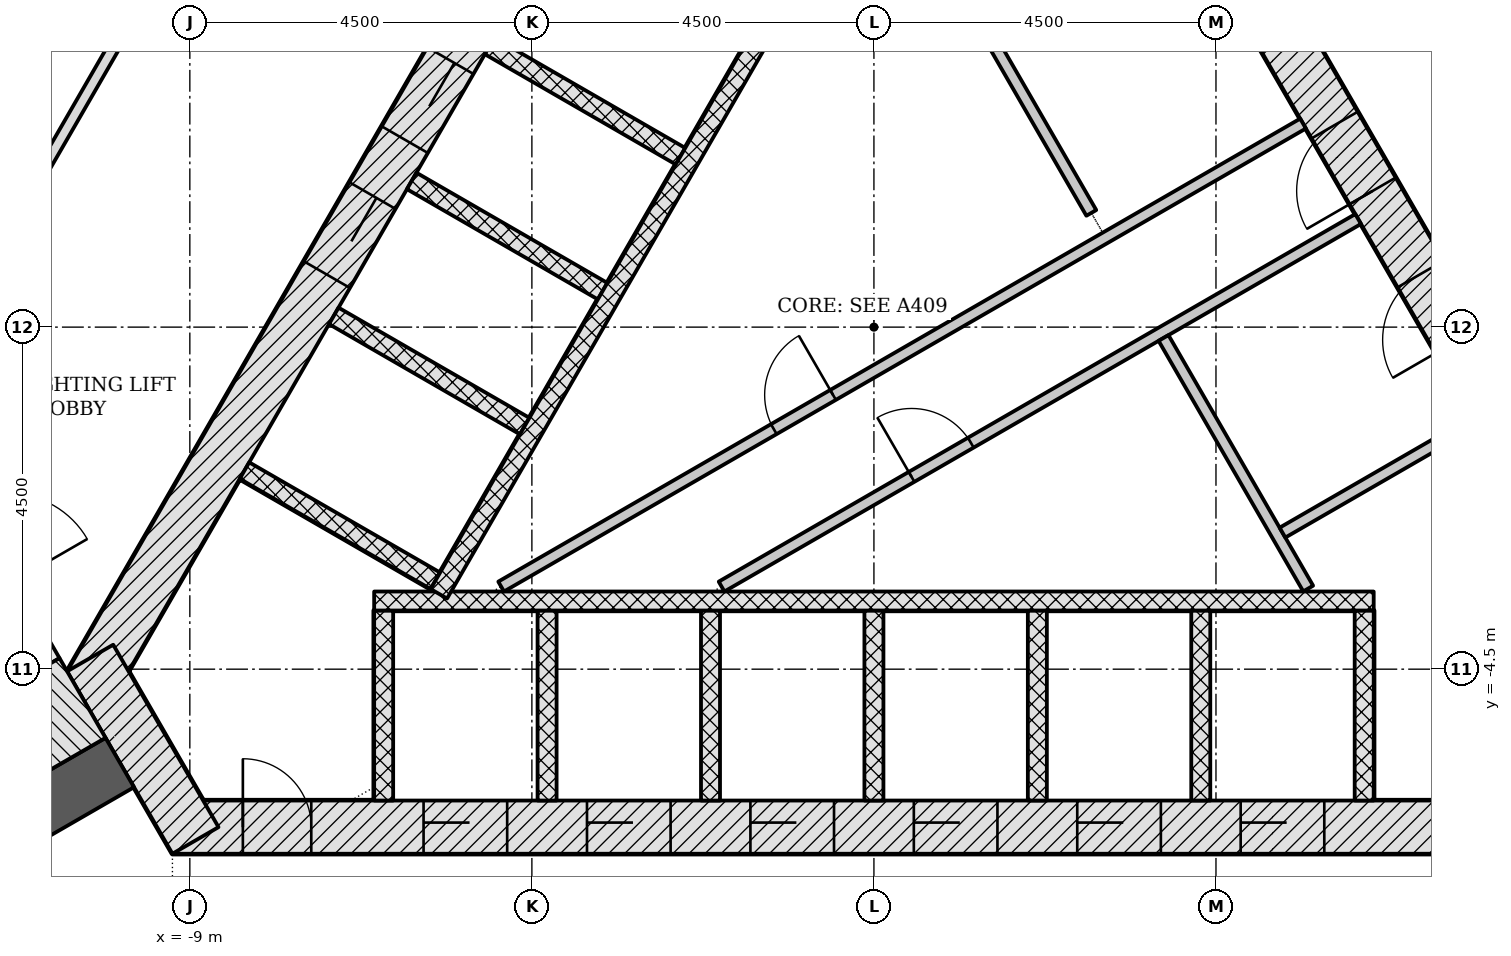
"""IFC4 building model, lengths in metres.
Left out: names, types, materials, properties, quantities, classifications, styles, units other than length and angle.
Written with IfcOpenShell. Run it as: python <this file> out.ifc"""

import sys

from ifc_helpers import new_model, si_unit, direction, frame, frame_2d, origin, place, context, subcontext, project, spatial, rectangle, extrude, element, fill, save


model = new_model("IFC4")
c1 = context("Model", 3, precision=1e-05, world=origin(), true_north=direction((0.0, 1.0)))
c2 = subcontext(c1, "Body", "Model", "MODEL_VIEW")
j1 = project(units=[si_unit("LENGTHUNIT", "METRE"), si_unit("PLANEANGLEUNIT", "RADIAN")], contexts=[c1])
p1 = place(None, origin())
s1 = spatial("IfcSite", under=j1, at=p1, CompositionType="ELEMENT")
p2 = place(p1, origin())
s2 = spatial("IfcBuilding", under=s1, at=p2, CompositionType="ELEMENT")
p3 = place(p2, frame((0.0, 0.0, 116.7)))
s3 = spatial("IfcBuildingStorey", under=s2, at=p3, CompositionType="ELEMENT", Elevation=116.7)
p4 = place(p3, frame((-9.229, -6.578, -0.2), z_axis=(0.0, 0.0, 1.0), x_axis=(1.0, 0.0, 0.0)))
e1 = element("IfcWall", 1, at=p4, inside=s3, PredefinedType="SHEAR", context=c2, shape_type="SweptSolid", body=[
    extrude(rectangle(XDim=18.458, YDim=0.7, at=frame_2d((9.229, 0.0))), origin(), (0.0, 0.0, 1.0), 3.6),
])
p5 = place(p4, frame((3.304, 0.0, 0.2)))
e2 = element("IfcOpeningElement", 2, at=p5, cuts=e1, PredefinedType="OPENING", context=c2, shape_type="SweptSolid", body=[
    extrude(rectangle(XDim=1.1, YDim=2.1, at=frame_2d((0.55, 1.05))), frame((0.0, 0.36, 0.0), z_axis=(0.0, -1.0, 0.0), x_axis=(1.0, 0.0, 0.0)), (0.0, 0.0, 1.0), 0.72),
])
p6 = place(p4, frame((5.454, 0.0, 0.2)))
e3 = element("IfcOpeningElement", 3, at=p6, cuts=e1, PredefinedType="OPENING", context=c2, shape_type="SweptSolid", body=[
    extrude(rectangle(XDim=1.1, YDim=2.1, at=frame_2d((0.55, 1.05))), frame((0.0, 0.36, 0.0), z_axis=(0.0, -1.0, 0.0), x_axis=(1.0, 0.0, 0.0)), (0.0, 0.0, 1.0), 0.72),
])
p7 = place(p4, frame((7.604, 0.0, 0.2)))
e4 = element("IfcOpeningElement", 4, at=p7, cuts=e1, PredefinedType="OPENING", context=c2, shape_type="SweptSolid", body=[
    extrude(rectangle(XDim=1.1, YDim=2.1, at=frame_2d((0.55, 1.05))), frame((0.0, 0.36, 0.0), z_axis=(0.0, -1.0, 0.0), x_axis=(1.0, 0.0, 0.0)), (0.0, 0.0, 1.0), 0.72),
])
p8 = place(p4, frame((9.754, 0.0, 0.2)))
e5 = element("IfcOpeningElement", 5, at=p8, cuts=e1, PredefinedType="OPENING", context=c2, shape_type="SweptSolid", body=[
    extrude(rectangle(XDim=1.1, YDim=2.1, at=frame_2d((0.55, 1.05))), frame((0.0, 0.36, 0.0), z_axis=(0.0, -1.0, 0.0), x_axis=(1.0, 0.0, 0.0)), (0.0, 0.0, 1.0), 0.72),
])
p9 = place(p4, frame((11.904, 0.0, 0.2)))
e6 = element("IfcOpeningElement", 6, at=p9, cuts=e1, PredefinedType="OPENING", context=c2, shape_type="SweptSolid", body=[
    extrude(rectangle(XDim=1.1, YDim=2.1, at=frame_2d((0.55, 1.05))), frame((0.0, 0.36, 0.0), z_axis=(0.0, -1.0, 0.0), x_axis=(1.0, 0.0, 0.0)), (0.0, 0.0, 1.0), 0.72),
])
p10 = place(p4, frame((14.054, 0.0, 0.2)))
e7 = element("IfcOpeningElement", 7, at=p10, cuts=e1, PredefinedType="OPENING", context=c2, shape_type="SweptSolid", body=[
    extrude(rectangle(XDim=1.1, YDim=2.1, at=frame_2d((0.55, 1.05))), frame((0.0, 0.36, 0.0), z_axis=(0.0, -1.0, 0.0), x_axis=(1.0, 0.0, 0.0)), (0.0, 0.0, 1.0), 0.72),
])
p11 = place(p4, frame((0.926, 0.0, 0.2)))
e8 = element("IfcOpeningElement", 8, at=p11, cuts=e1, PredefinedType="OPENING", context=c2, shape_type="SweptSolid", body=[
    extrude(rectangle(XDim=0.9, YDim=2.1, at=frame_2d((0.45, 1.05))), frame((0.0, 0.36, 0.0), z_axis=(0.0, -1.0, 0.0), x_axis=(1.0, 0.0, 0.0)), (0.0, 0.0, 1.0), 0.72),
])
p12 = place(p3, frame((10.311, -4.703, -0.2), z_axis=(0.0, 0.0, 1.0), x_axis=(-0.500001446645, 0.866024568562, 0.0)))
e9 = element("IfcWall", 9, at=p12, inside=s3, PredefinedType="SHEAR", context=c2, shape_type="SweptSolid", body=[
    extrude(rectangle(XDim=18.458, YDim=0.7, at=frame_2d((9.229, 0.0))), origin(), (0.0, 0.0, 1.0), 3.6),
])
p13 = place(p12, frame((7.5, 0.0, 0.2)))
e10 = element("IfcOpeningElement", 10, at=p13, cuts=e9, PredefinedType="OPENING", context=c2, shape_type="SweptSolid", body=[
    extrude(rectangle(XDim=1.0, YDim=2.1, at=frame_2d((0.5, 1.05))), frame((0.0, 0.36, 0.0), z_axis=(0.0, -1.0, 0.0), x_axis=(1.0, 0.0, 0.0)), (0.0, 0.0, 1.0), 0.72),
])
p14 = place(p12, frame((1.852, 0.0, 0.2)))
e11 = element("IfcOpeningElement", 11, at=p14, cuts=e9, PredefinedType="OPENING", context=c2, shape_type="SweptSolid", body=[
    extrude(rectangle(XDim=0.9, YDim=2.1, at=frame_2d((0.45, 1.05))), frame((0.0, 0.36, 0.0), z_axis=(0.0, -1.0, 0.0), x_axis=(1.0, 0.0, 0.0)), (0.0, 0.0, 1.0), 0.72),
])
p15 = place(p12, frame((5.238, 0.0, 0.2)))
e12 = element("IfcOpeningElement", 12, at=p15, cuts=e9, PredefinedType="OPENING", context=c2, shape_type="SweptSolid", body=[
    extrude(rectangle(XDim=1.0, YDim=2.1, at=frame_2d((0.5, 1.05))), frame((0.0, 0.36, 0.0), z_axis=(0.0, -1.0, 0.0), x_axis=(1.0, 0.0, 0.0)), (0.0, 0.0, 1.0), 0.72),
])
p16 = place(p12, frame((13.63, 0.0, 0.2)))
e13 = element("IfcOpeningElement", 13, at=p16, cuts=e9, PredefinedType="OPENING", context=c2, shape_type="SweptSolid", body=[
    extrude(rectangle(XDim=0.9, YDim=2.1, at=frame_2d((0.45, 1.05))), frame((0.0, 0.36, 0.0), z_axis=(0.0, -1.0, 0.0), x_axis=(1.0, 0.0, 0.0)), (0.0, 0.0, 1.0), 0.72),
])
p17 = place(p3, frame((-1.083, 11.281, -0.2), z_axis=(0.0, 0.0, 1.0), x_axis=(-0.500001446645, -0.866024568562, 0.0)))
e14 = element("IfcWall", 14, at=p17, inside=s3, PredefinedType="SHEAR", context=c2, shape_type="SweptSolid", body=[
    extrude(rectangle(XDim=18.458, YDim=0.7, at=frame_2d((9.229, 0.0))), origin(), (0.0, 0.0, 1.0), 3.6),
])
p18 = place(p17, frame((8.979, 0.0, 0.2)))
e15 = element("IfcOpeningElement", 15, at=p18, cuts=e14, PredefinedType="OPENING", context=c2, shape_type="SweptSolid", body=[
    extrude(rectangle(XDim=1.2, YDim=2.1, at=frame_2d((0.6, 1.05))), frame((0.0, 0.36, 0.0), z_axis=(0.0, -1.0, 0.0), x_axis=(1.0, 0.0, 0.0)), (0.0, 0.0, 1.0), 0.72),
])
p19 = place(p17, frame((11.029, 0.0, 0.2)))
e16 = element("IfcOpeningElement", 16, at=p19, cuts=e14, PredefinedType="OPENING", context=c2, shape_type="SweptSolid", body=[
    extrude(rectangle(XDim=1.2, YDim=2.1, at=frame_2d((0.6, 1.05))), frame((0.0, 0.36, 0.0), z_axis=(0.0, -1.0, 0.0), x_axis=(1.0, 0.0, 0.0)), (0.0, 0.0, 1.0), 0.72),
])
p20 = place(p3, frame((-10.311, -4.353, -0.2), z_axis=(0.0, 0.0, 1.0), x_axis=(0.500042739161, -0.866000726912, 0.0)))
e17 = element("IfcWall", 17, at=p20, inside=s3, PredefinedType="SHEAR", context=c2, shape_type="SweptSolid", body=[
    extrude(rectangle(XDim=2.771, YDim=0.7, at=frame_2d((1.386, 0.0))), origin(), (0.0, 0.0, 1.0), 3.6),
])
p21 = place(p3, frame((-9.922, -5.728, -0.2), z_axis=(0.0, 0.0, 1.0), x_axis=(-0.866024913782, -0.500000848707, 0.0)))
e18 = element("IfcWall", 18, at=p21, inside=s3, PredefinedType="SHEAR", context=c2, shape_type="SweptSolid", body=[
    extrude(rectangle(XDim=11.539, YDim=0.75, at=frame_2d((5.769, 0.0))), origin(), (0.0, 0.0, 1.0), 3.6),
])
for number, where, z_axis, x_axis in (
    (19, (-6.45, -6.228, -0.2), (0.0, 0.0, 1.0), (0.0, 1.0, 0.0)),
    (20, (-4.3, -6.228, -0.2), (0.0, 0.0, 1.0), (0.0, 1.0, 0.0)),
    (21, (-2.15, -6.228, -0.2), (0.0, 0.0, 1.0), (0.0, 1.0, 0.0)),
    (22, (0.0, -6.228, -0.2), (0.0, 0.0, 1.0), (0.0, 1.0, 0.0)),
    (23, (2.15, -6.228, -0.2), (0.0, 0.0, 1.0), (0.0, 1.0, 0.0)),
    (24, (4.3, -6.228, -0.2), (0.0, 0.0, 1.0), (0.0, 1.0, 0.0)),
    (25, (6.45, -6.228, -0.2), (0.0, 0.0, 1.0), (0.0, 1.0, 0.0)),
):
    element("IfcWall", number, at=place(p3, frame(where, z_axis=z_axis, x_axis=x_axis)), inside=s3, PredefinedType="PARTITIONING", context=c2, shape_type="SweptSolid", body=[
        extrude(rectangle(XDim=2.5, YDim=0.25, at=frame_2d((1.25, 0.0))), origin(), (0.0, 0.0, 1.0), 3.6),
    ])
p22 = place(p3, frame((-6.575, -3.603, 0.0), z_axis=(0.0, 0.0, 1.0), x_axis=(1.0, 0.0, 0.0)))
e26 = element("IfcWall", 26, at=p22, inside=s3, PredefinedType="PARTITIONING", context=c2, shape_type="SweptSolid", body=[
    extrude(rectangle(XDim=13.15, YDim=0.25, at=frame_2d((6.575, 0.0))), origin(), (0.0, 0.0, 1.0), 3.4),
])
for number, where, z_axis, x_axis in (
    (27, (-5.056, 3.699, -0.2), (0.0, 0.0, 1.0), (0.866, -0.5, 0.0)),
    (28, (-6.081, 1.923, -0.2), (0.0, 0.0, 1.0), (0.866, -0.5, 0.0)),
    (29, (-7.106, 0.148, -0.2), (0.0, 0.0, 1.0), (0.866, -0.5, 0.0)),
    (30, (-8.281, -1.887, -0.2), (0.0, 0.0, 1.0), (0.866, -0.5, 0.0)),
):
    element("IfcWall", number, at=place(p3, frame(where, z_axis=z_axis, x_axis=x_axis)), inside=s3, PredefinedType="PARTITIONING", context=c2, shape_type="SweptSolid", body=[
        extrude(rectangle(XDim=2.9, YDim=0.25, at=frame_2d((1.45, 0.0))), origin(), (0.0, 0.0, 1.0), 3.6),
    ])
p23 = place(p3, frame((0.176, 6.711, 0.0), z_axis=(0.0, 0.0, 1.0), x_axis=(-0.500004227369, -0.866022963098, 0.0)))
e31 = element("IfcWall", 31, at=p23, inside=s3, PredefinedType="PARTITIONING", context=c2, shape_type="SweptSolid", body=[
    extrude(rectangle(XDim=11.8, YDim=0.25, at=frame_2d((5.9, 0.0))), origin(), (0.0, 0.0, 1.0), 3.4),
])
p24 = place(p3, frame((-4.904, -3.413, 0.0), z_axis=(0.0, 0.0, 1.0), x_axis=(0.866020716117, 0.500008119189, 0.0)))
e32 = element("IfcWall", 32, at=p24, inside=s3, PredefinedType="PARTITIONING", context=c2, shape_type="SweptSolid", body=[
    extrude(rectangle(XDim=12.182, YDim=0.15, at=frame_2d((6.091, 0.0))), origin(), (0.0, 0.0, 1.0), 3.4),
])
p25 = place(p24, frame((4.142, 0.0, 0.0)))
e33 = element("IfcOpeningElement", 33, at=p25, cuts=e32, PredefinedType="OPENING", context=c2, shape_type="SweptSolid", body=[
    extrude(rectangle(XDim=0.9, YDim=2.1, at=frame_2d((0.45, 1.05))), frame((0.0, 0.085, 0.0), z_axis=(0.0, -1.0, 0.0), x_axis=(1.0, 0.0, 0.0)), (0.0, 0.0, 1.0), 0.17),
])
p26 = place(p3, frame((-2.004, -3.413, 0.0), z_axis=(0.0, 0.0, 1.0), x_axis=(0.866030034802, 0.499991978756, 0.0)))
e34 = element("IfcWall", 34, at=p26, inside=s3, PredefinedType="PARTITIONING", context=c2, shape_type="SweptSolid", body=[
    extrude(rectangle(XDim=9.671, YDim=0.15, at=frame_2d((4.835, 0.0))), origin(), (0.0, 0.0, 1.0), 3.4),
])
p27 = place(p26, frame((2.886, 0.0, 0.0)))
e35 = element("IfcOpeningElement", 35, at=p27, cuts=e34, PredefinedType="OPENING", context=c2, shape_type="SweptSolid", body=[
    extrude(rectangle(XDim=0.9, YDim=2.1, at=frame_2d((0.45, 1.05))), frame((0.0, 0.085, 0.0), z_axis=(0.0, -1.0, 0.0), x_axis=(1.0, 0.0, 0.0)), (0.0, 0.0, 1.0), 0.17),
])
p28 = place(p3, frame((2.86, 1.503, 0.0), z_axis=(0.0, 0.0, 1.0), x_axis=(-0.500014382217, 0.866017100048, 0.0)))
e36 = element("IfcWall", 36, at=p28, inside=s3, PredefinedType="PARTITIONING", context=c2, shape_type="SweptSolid", body=[
    extrude(rectangle(XDim=5.502, YDim=0.15, at=frame_2d((2.751, 0.0))), origin(), (0.0, 0.0, 1.0), 3.4),
])
p29 = place(p3, frame((5.713, -3.439, 0.0), z_axis=(0.0, 0.0, 1.0), x_axis=(-0.499981559197, 0.866036050325, 0.0)))
e37 = element("IfcWall", 37, at=p29, inside=s3, PredefinedType="PARTITIONING", context=c2, shape_type="SweptSolid", body=[
    extrude(rectangle(XDim=3.806, YDim=0.15, at=frame_2d((1.903, 0.0))), origin(), (0.0, 0.0, 1.0), 3.4),
])
p30 = place(p3, frame((5.375, -2.703, 0.0), z_axis=(0.0, 0.0, 1.0), x_axis=(0.866046596414, 0.499963291492, 0.0)))
e38 = element("IfcWall", 38, at=p30, inside=s3, PredefinedType="PARTITIONING", context=c2, shape_type="SweptSolid", body=[
    extrude(rectangle(XDim=2.925, YDim=0.15, at=frame_2d((1.462, 0.0))), origin(), (0.0, 0.0, 1.0), 3.4),
])
p31 = place(p3, frame((-12.576, -1.331, -0.2), z_axis=(0.0, 0.0, 1.0), x_axis=(0.499970499736, -0.8660424351, 0.0)))
e39 = element("IfcWall", 39, at=p31, inside=s3, PredefinedType="SHEAR", context=c2, shape_type="SweptSolid", body=[
    extrude(rectangle(XDim=3.55, YDim=0.2, at=frame_2d((1.775, 0.0))), origin(), (0.0, 0.0, 1.0), 3.6),
])
p32 = place(p31, frame((1.175, 0.0, 0.2)))
e40 = element("IfcOpeningElement", 40, at=p32, cuts=e39, PredefinedType="OPENING", context=c2, shape_type="SweptSolid", body=[
    extrude(rectangle(XDim=1.2, YDim=2.1, at=frame_2d((0.6, 1.05))), frame((0.0, 0.11, 0.0), z_axis=(0.0, -1.0, 0.0), x_axis=(1.0, 0.0, 0.0)), (0.0, 0.0, 1.0), 0.22),
])
p33 = place(p3, frame((-10.412, -4.879, -0.2), z_axis=(0.0, 0.0, 1.0), x_axis=(-0.866026919366, -0.499997374926, 0.0)))
e41 = element("IfcWall", 41, at=p33, inside=s3, PredefinedType="SHEAR", context=c2, shape_type="SweptSolid", body=[
    extrude(rectangle(XDim=7.2, YDim=1.211, at=frame_2d((3.6, 0.0))), origin(), (0.0, 0.0, 1.0), 3.6),
])
p34 = place(p3, frame((-16.169, -3.099, 0.0), z_axis=(0.0, 0.0, 1.0), x_axis=(0.499999805269, 0.866025516212, 0.0)))
e42 = element("IfcWall", 42, at=p34, inside=s3, PredefinedType="PARTITIONING", context=c2, shape_type="SweptSolid", body=[
    extrude(rectangle(XDim=22.097, YDim=0.15, at=frame_2d((11.049, 0.0))), origin(), (0.0, 0.0, 1.0), 2.847),
])
p35 = place(p34, frame((17.842, 0.0, 0.0)))
e43 = element("IfcOpeningElement", 43, at=p35, cuts=e42, PredefinedType="OPENING", context=c2, shape_type="SweptSolid", body=[
    extrude(rectangle(XDim=1.5, YDim=2.1, at=frame_2d((0.75, 1.05))), frame((0.0, 0.085, 0.0), z_axis=(0.0, -1.0, 0.0), x_axis=(1.0, 0.0, 0.0)), (0.0, 0.0, 1.0), 0.17),
])
p36 = place(p34, frame((12.474, 0.0, 0.0)))
e44 = element("IfcOpeningElement", 44, at=p36, cuts=e42, PredefinedType="OPENING", context=c2, shape_type="SweptSolid", body=[
    extrude(rectangle(XDim=1.0, YDim=2.1, at=frame_2d((0.5, 1.05))), frame((0.0, 0.085, 0.0), z_axis=(0.0, -1.0, 0.0), x_axis=(1.0, 0.0, 0.0)), (0.0, 0.0, 1.0), 0.17),
])
p37 = place(p34, frame((4.503, 0.0, 0.0)))
e45 = element("IfcOpeningElement", 45, at=p37, cuts=e42, PredefinedType="OPENING", context=c2, shape_type="SweptSolid", body=[
    extrude(rectangle(XDim=1.5, YDim=2.1, at=frame_2d((0.75, 1.05))), frame((0.0, 0.085, 0.0), z_axis=(0.0, -1.0, 0.0), x_axis=(1.0, 0.0, 0.0)), (0.0, 0.0, 1.0), 0.17),
])
p38 = place(p3, frame((-4.407, 13.374, 0.0), z_axis=(0.0, 0.0, 1.0), x_axis=(-0.499997181693, -0.866027030928, 0.0)))
e46 = element("IfcWall", 46, at=p38, inside=s3, PredefinedType="PARTITIONING", context=c2, shape_type="SweptSolid", body=[
    extrude(rectangle(XDim=16.77, YDim=0.15, at=frame_2d((8.385, 0.0))), origin(), (0.0, 0.0, 1.0), 2.847),
])
p39 = place(p38, frame((8.879, 0.0, 0.0)))
e47 = element("IfcOpeningElement", 47, at=p39, cuts=e46, PredefinedType="OPENING", context=c2, shape_type="SweptSolid", body=[
    extrude(rectangle(XDim=1.0, YDim=2.1, at=frame_2d((0.5, 1.05))), frame((0.0, 0.085, 0.0), z_axis=(0.0, -1.0, 0.0), x_axis=(1.0, 0.0, 0.0)), (0.0, 0.0, 1.0), 0.17),
])
p40 = place(p3, frame((5.289, 8.446, 0.0), z_axis=(0.0, 0.0, 1.0), x_axis=(0.499996620721, -0.866027354803, 0.0)))
e48 = element("IfcWall", 48, at=p40, inside=s3, PredefinedType="PARTITIONING", context=c2, shape_type="SweptSolid", body=[
    extrude(rectangle(XDim=15.057, YDim=0.15, at=frame_2d((7.528, 0.0))), origin(), (0.0, 0.0, 1.0), 2.847),
])
p41 = place(p40, frame((11.17, 0.0, 0.0)))
e49 = element("IfcOpeningElement", 49, at=p41, cuts=e48, PredefinedType="OPENING", context=c2, shape_type="SweptSolid", body=[
    extrude(rectangle(XDim=1.0, YDim=2.1, at=frame_2d((0.5, 1.05))), frame((0.0, 0.085, 0.0), z_axis=(0.0, -1.0, 0.0), x_axis=(1.0, 0.0, 0.0)), (0.0, 0.0, 1.0), 0.17),
])
p42 = place(p40, frame((4.736, 0.0, 0.0)))
e50 = element("IfcOpeningElement", 50, at=p42, cuts=e48, PredefinedType="OPENING", context=c2, shape_type="SweptSolid", body=[
    extrude(rectangle(XDim=1.0, YDim=2.1, at=frame_2d((0.5, 1.05))), frame((0.0, 0.085, 0.0), z_axis=(0.0, -1.0, 0.0), x_axis=(1.0, 0.0, 0.0)), (0.0, 0.0, 1.0), 0.17),
])
p43 = place(p3, frame((-11.358, -6.99, 0.0), z_axis=(0.0, 0.0, 1.0), x_axis=(0.500050590816, -0.865996193193, 0.0)))
e51 = element("IfcWall", 51, at=p43, inside=s3, PredefinedType="PARTITIONING", context=c2, shape_type="SweptSolid", body=[
    extrude(rectangle(XDim=2.168, YDim=0.15, at=frame_2d((1.084, 0.0))), origin(), (0.0, 0.0, 1.0), 3.4),
])
p44 = place(p5, origin())
e52 = element("IfcDoor", 52, at=p44, inside=s3, OperationType="DOUBLE_DOOR_SLIDING", PredefinedType="DOOR", context=c2, shape_type="SweptSolid", body=[
    extrude(rectangle(XDim=1.1, YDim=2.1, at=frame_2d((0.55, 1.05))), frame((0.0, 0.025, 0.0), z_axis=(0.0, -1.0, 0.0), x_axis=(1.0, 0.0, 0.0)), (0.0, 0.0, 1.0), 0.05),
])
fill(e2, e52)
p45 = place(p6, origin())
e53 = element("IfcDoor", 53, at=p45, inside=s3, OperationType="DOUBLE_DOOR_SLIDING", PredefinedType="DOOR", context=c2, shape_type="SweptSolid", body=[
    extrude(rectangle(XDim=1.1, YDim=2.1, at=frame_2d((0.55, 1.05))), frame((0.0, 0.025, 0.0), z_axis=(0.0, -1.0, 0.0), x_axis=(1.0, 0.0, 0.0)), (0.0, 0.0, 1.0), 0.05),
])
fill(e3, e53)
p46 = place(p7, origin())
e54 = element("IfcDoor", 54, at=p46, inside=s3, OperationType="DOUBLE_DOOR_SLIDING", PredefinedType="DOOR", context=c2, shape_type="SweptSolid", body=[
    extrude(rectangle(XDim=1.1, YDim=2.1, at=frame_2d((0.55, 1.05))), frame((0.0, 0.025, 0.0), z_axis=(0.0, -1.0, 0.0), x_axis=(1.0, 0.0, 0.0)), (0.0, 0.0, 1.0), 0.05),
])
fill(e4, e54)
p47 = place(p8, origin())
e55 = element("IfcDoor", 55, at=p47, inside=s3, OperationType="DOUBLE_DOOR_SLIDING", PredefinedType="DOOR", context=c2, shape_type="SweptSolid", body=[
    extrude(rectangle(XDim=1.1, YDim=2.1, at=frame_2d((0.55, 1.05))), frame((0.0, 0.025, 0.0), z_axis=(0.0, -1.0, 0.0), x_axis=(1.0, 0.0, 0.0)), (0.0, 0.0, 1.0), 0.05),
])
fill(e5, e55)
p48 = place(p9, origin())
e56 = element("IfcDoor", 56, at=p48, inside=s3, OperationType="DOUBLE_DOOR_SLIDING", PredefinedType="DOOR", context=c2, shape_type="SweptSolid", body=[
    extrude(rectangle(XDim=1.1, YDim=2.1, at=frame_2d((0.55, 1.05))), frame((0.0, 0.025, 0.0), z_axis=(0.0, -1.0, 0.0), x_axis=(1.0, 0.0, 0.0)), (0.0, 0.0, 1.0), 0.05),
])
fill(e6, e56)
p49 = place(p10, origin())
e57 = element("IfcDoor", 57, at=p49, inside=s3, OperationType="DOUBLE_DOOR_SLIDING", PredefinedType="DOOR", context=c2, shape_type="SweptSolid", body=[
    extrude(rectangle(XDim=1.1, YDim=2.1, at=frame_2d((0.55, 1.05))), frame((0.0, 0.025, 0.0), z_axis=(0.0, -1.0, 0.0), x_axis=(1.0, 0.0, 0.0)), (0.0, 0.0, 1.0), 0.05),
])
fill(e7, e57)
p50 = place(p18, origin())
e58 = element("IfcDoor", 58, at=p50, inside=s3, OperationType="DOUBLE_DOOR_SLIDING", PredefinedType="DOOR", context=c2, shape_type="SweptSolid", body=[
    extrude(rectangle(XDim=1.2, YDim=2.1, at=frame_2d((0.6, 1.05))), frame((0.0, 0.025, 0.0), z_axis=(0.0, -1.0, 0.0), x_axis=(1.0, 0.0, 0.0)), (0.0, 0.0, 1.0), 0.05),
])
fill(e15, e58)
p51 = place(p19, origin())
e59 = element("IfcDoor", 59, at=p51, inside=s3, OperationType="DOUBLE_DOOR_SLIDING", PredefinedType="DOOR", context=c2, shape_type="SweptSolid", body=[
    extrude(rectangle(XDim=1.2, YDim=2.1, at=frame_2d((0.6, 1.05))), frame((0.0, 0.025, 0.0), z_axis=(0.0, -1.0, 0.0), x_axis=(1.0, 0.0, 0.0)), (0.0, 0.0, 1.0), 0.05),
])
fill(e16, e59)
p52 = place(p13, origin())
e60 = element("IfcDoor", 60, at=p52, inside=s3, OperationType="SINGLE_SWING_LEFT", PredefinedType="DOOR", context=c2, shape_type="SweptSolid", body=[
    extrude(rectangle(XDim=1.0, YDim=2.1, at=frame_2d((0.5, 1.05))), frame((0.0, 0.075, 0.0), z_axis=(0.0, -1.0, 0.0), x_axis=(1.0, 0.0, 0.0)), (0.0, 0.0, 1.0), 0.15),
])
fill(e10, e60)
p53 = place(p15, origin())
e61 = element("IfcDoor", 61, at=p53, inside=s3, OperationType="SINGLE_SWING_LEFT", PredefinedType="DOOR", context=c2, shape_type="SweptSolid", body=[
    extrude(rectangle(XDim=1.0, YDim=2.1, at=frame_2d((0.5, 1.05))), frame((0.0, 0.075, 0.0), z_axis=(0.0, -1.0, 0.0), x_axis=(1.0, 0.0, 0.0)), (0.0, 0.0, 1.0), 0.15),
])
fill(e12, e61)
p54 = place(p27, origin())
e62 = element("IfcDoor", 62, at=p54, inside=s3, OperationType="SINGLE_SWING_LEFT", PredefinedType="DOOR", context=c2, shape_type="SweptSolid", body=[
    extrude(rectangle(XDim=0.9, YDim=2.1, at=frame_2d((0.45, 1.05))), frame((0.0, 0.025, 0.0), z_axis=(0.0, -1.0, 0.0), x_axis=(1.0, 0.0, 0.0)), (0.0, 0.0, 1.0), 0.05),
])
fill(e35, e62)
p55 = place(p25, origin())
e63 = element("IfcDoor", 63, at=p55, inside=s3, OperationType="SINGLE_SWING_RIGHT", PredefinedType="DOOR", context=c2, shape_type="SweptSolid", body=[
    extrude(rectangle(XDim=0.9, YDim=2.1, at=frame_2d((0.45, 1.05))), frame((0.0, 0.025, 0.0), z_axis=(0.0, -1.0, 0.0), x_axis=(1.0, 0.0, 0.0)), (0.0, 0.0, 1.0), 0.05),
])
fill(e33, e63)
p56 = place(p11, origin())
e64 = element("IfcDoor", 64, at=p56, inside=s3, OperationType="SINGLE_SWING_LEFT", PredefinedType="DOOR", context=c2, shape_type="SweptSolid", body=[
    extrude(rectangle(XDim=0.9, YDim=2.1, at=frame_2d((0.45, 1.05))), frame((0.0, 0.075, 0.0), z_axis=(0.0, -1.0, 0.0), x_axis=(1.0, 0.0, 0.0)), (0.0, 0.0, 1.0), 0.15),
])
fill(e8, e64)
save(model, sys.argv[1])
